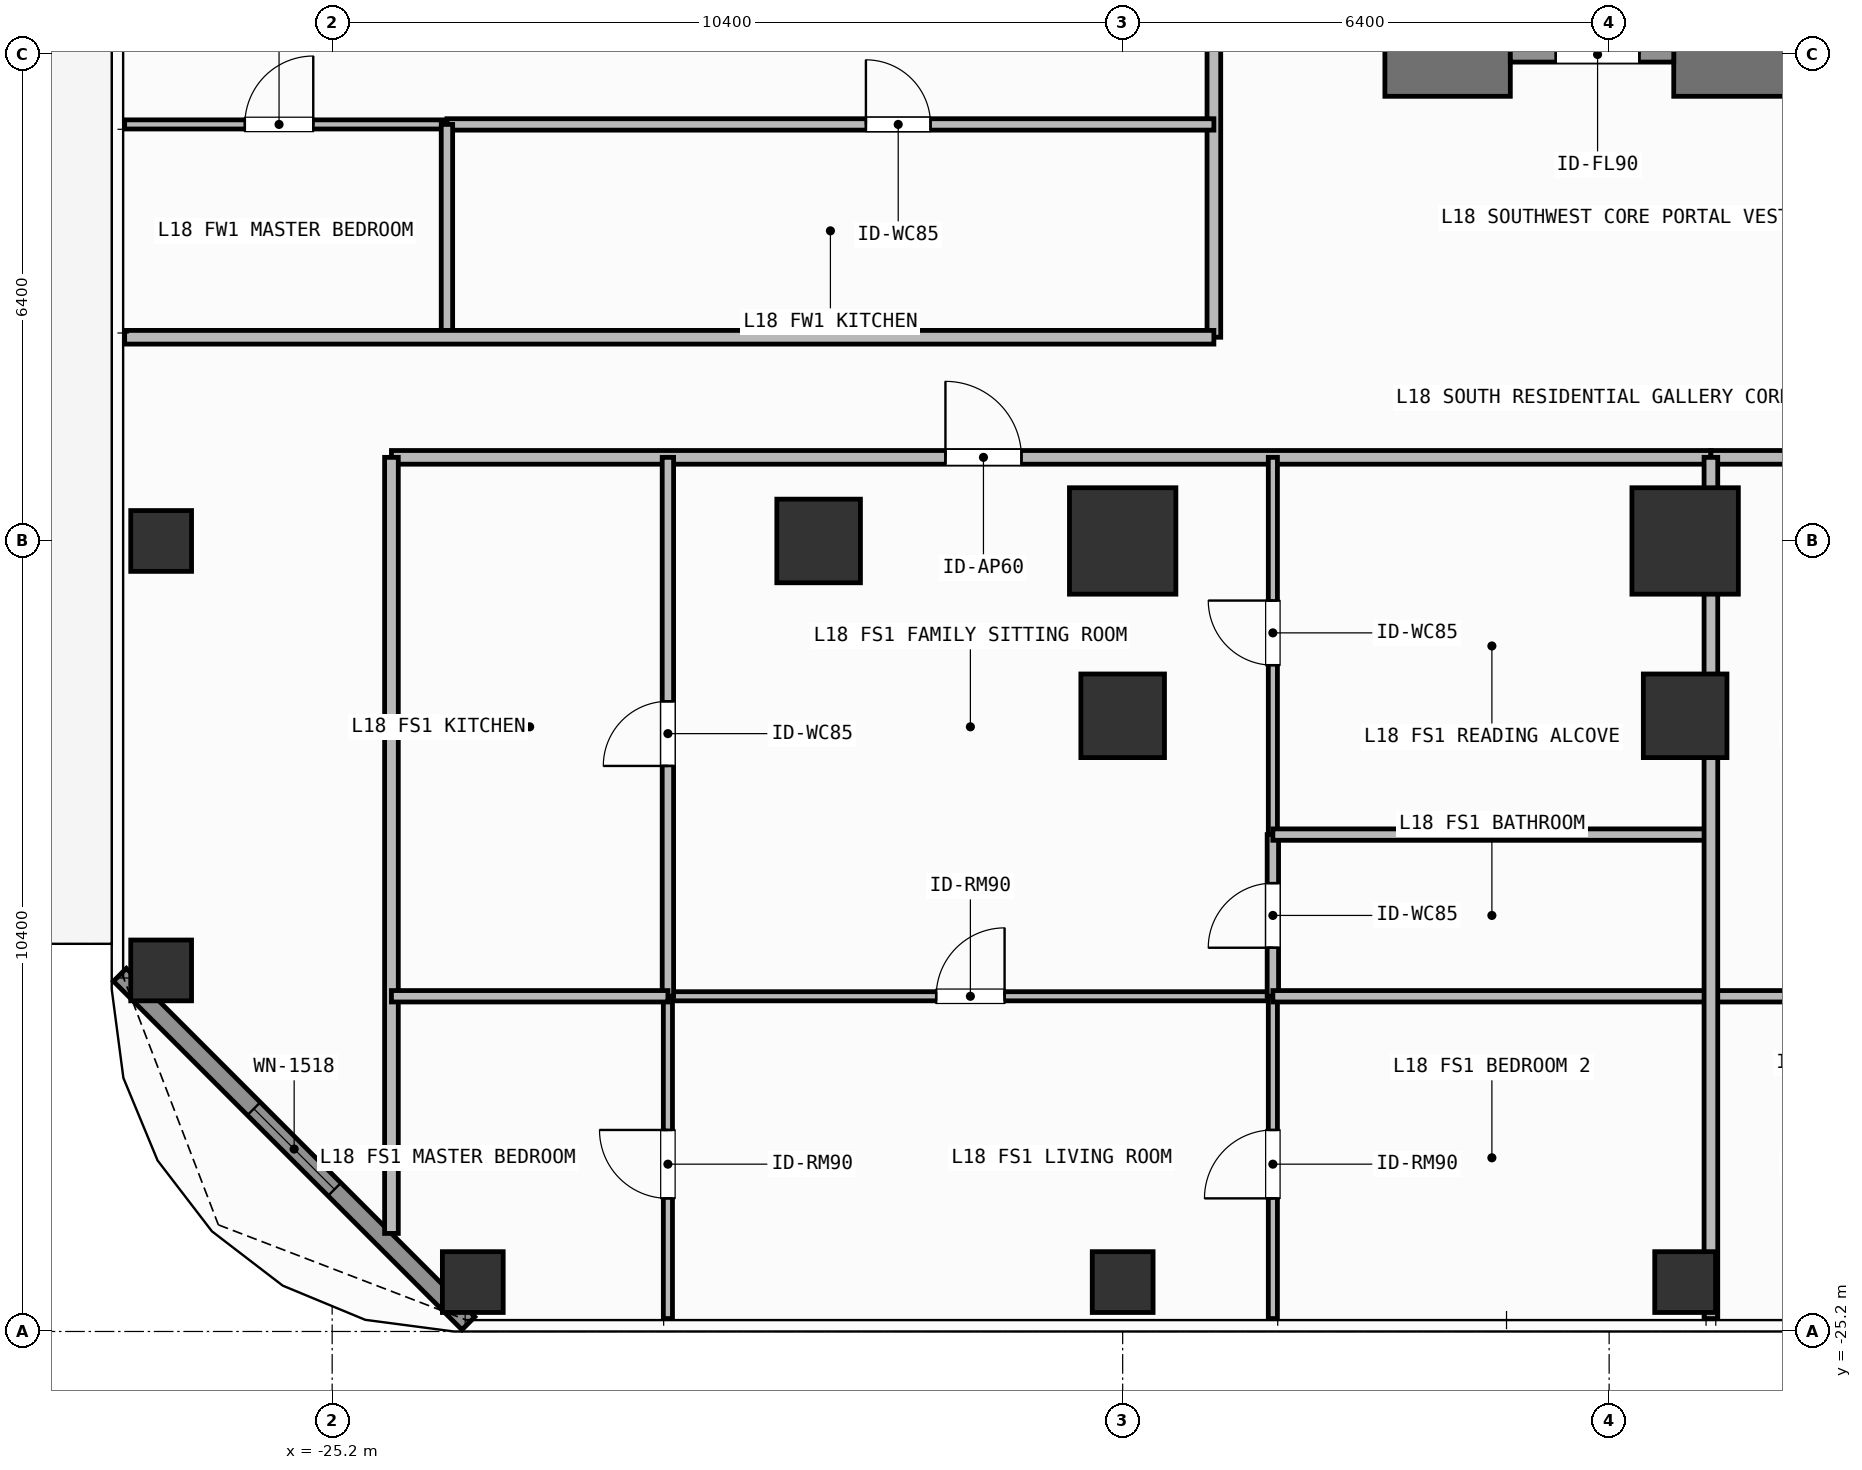
"""IFC4 building model, lengths in metres.
Left out: names, types, materials, properties, quantities, classifications, styles, units other than length and angle.
Written with IfcOpenShell. Run it as: python <this file> out.ifc"""

import sys

from ifc_helpers import new_model, si_unit, direction, frame, frame_2d, origin, origin_2d, place, context, subcontext, project, spatial, rectangle, hollow_rectangle, extrude, element, fill, save


model = new_model("IFC4")
c1 = context("Model", 3, precision=1e-05, world=origin(), true_north=direction((0.0, 1.0)))
c2 = subcontext(c1, "Body", "Model", "MODEL_VIEW")
j1 = project(units=[si_unit("LENGTHUNIT", "METRE"), si_unit("PLANEANGLEUNIT", "RADIAN")], contexts=[c1])
p1 = place(None, origin())
s1 = spatial("IfcSite", under=j1, at=p1, CompositionType="ELEMENT")
p2 = place(p1, origin())
s2 = spatial("IfcBuilding", under=s1, at=p2, CompositionType="ELEMENT")
p3 = place(p2, frame((0.0, 0.0, 69.6)))
s3 = spatial("IfcBuildingStorey", under=s2, at=p3, CompositionType="ELEMENT", Elevation=69.6)
p4 = place(p3, frame((-11.35, -8.4, 0.0), z_axis=(0.0, 0.0, 1.0), x_axis=(1.0, 0.0, 0.0)))
e1 = element("IfcWall", 1, at=p4, inside=s3, PredefinedType="SHEAR", context=c2, shape_type="SweptSolid", body=[
    extrude(rectangle(XDim=1.65, YDim=1.1, at=frame_2d((0.825, 0.0))), origin(), (0.0, 0.0, 1.0), 3.9),
])
p5 = place(p3, frame((-7.55, -8.4, 0.0), z_axis=(0.0, 0.0, 1.0), x_axis=(1.0, 0.0, 0.0)))
e2 = element("IfcWall", 2, at=p5, inside=s3, PredefinedType="SHEAR", context=c2, shape_type="SweptSolid", body=[
    extrude(rectangle(XDim=3.35, YDim=1.1, at=frame_2d((1.675, 0.0))), origin(), (0.0, 0.0, 1.0), 3.9),
])
for number, where, z_axis, x_axis in (
    (3, (-14.8, -14.8, 0.0), (0.0, 0.0, 1.0), (1.0, 0.0, 0.0)),
    (4, (-7.4, -14.8, 0.0), (0.0, 0.0, 1.0), (1.0, 0.0, 0.0)),
):
    element("IfcColumn", number, at=place(p3, frame(where, z_axis=z_axis, x_axis=x_axis)), inside=s3, PredefinedType="COLUMN", context=c2, shape_type="SweptSolid", body=[
        extrude(rectangle(XDim=1.4, YDim=1.4, at=origin_2d()), origin(), (0.0, 0.0, 1.0), 3.9),
    ])
for number, where, z_axis, x_axis in (
    (5, (-18.8, -14.8, 0.0), (0.0, 0.0, 1.0), (1.0, 0.0, 0.0)),
    (6, (-14.8, -17.1, 0.0), (0.0, 0.0, 1.0), (1.0, 0.0, 0.0)),
    (7, (-7.4, -17.1, 0.0), (0.0, 0.0, 1.0), (1.0, 0.0, 0.0)),
):
    element("IfcColumn", number, at=place(p3, frame(where, z_axis=z_axis, x_axis=x_axis)), inside=s3, PredefinedType="COLUMN", context=c2, shape_type="SweptSolid", body=[
        extrude(rectangle(XDim=1.1, YDim=1.1, at=origin_2d()), origin(), (0.0, 0.0, 1.0), 3.9),
    ])
for number, where, z_axis, x_axis in (
    (8, (-23.35, -24.55, 0.0), (0.0, 0.0, 1.0), (1.0, 0.0, 0.0)),
    (9, (-27.45, -20.45, 0.0), (0.0, 0.0, 1.0), (1.0, 0.0, 0.0)),
    (10, (-14.8, -24.55, 0.0), (0.0, 0.0, 1.0), (1.0, 0.0, 0.0)),
    (11, (-7.4, -24.55, 0.0), (0.0, 0.0, 1.0), (1.0, 0.0, 0.0)),
    (12, (-27.45, -14.8, 0.0), (0.0, 0.0, 1.0), (1.0, 0.0, 0.0)),
):
    element("IfcColumn", number, at=place(p3, frame(where, z_axis=z_axis, x_axis=x_axis)), inside=s3, PredefinedType="COLUMN", context=c2, shape_type="SweptSolid", body=[
        extrude(hollow_rectangle(XDim=0.8, YDim=0.8, WallThickness=0.036, at=origin_2d()), origin(), (0.0, 0.0, 1.0), 3.9),
    ])
p6 = place(p3, frame((-23.408, -25.092, 0.0), z_axis=(0.0, 0.0, 1.0), x_axis=(-0.707106781187, 0.707106781187, 0.0)))
e13 = element("IfcWall", 13, at=p6, inside=s3, PredefinedType="SOLIDWALL", context=c2, shape_type="SweptSolid", body=[
    extrude(rectangle(XDim=6.484, YDim=0.24, at=frame_2d((3.242, 0.0))), origin(), (0.0, 0.0, 1.0), 3.68),
])
p7 = place(p6, frame((2.492, 0.0, 0.8)))
e14 = element("IfcOpeningElement", 14, at=p7, cuts=e13, PredefinedType="OPENING", context=c2, shape_type="SweptSolid", body=[
    extrude(rectangle(XDim=1.5, YDim=1.85, at=frame_2d((0.75, 0.925))), frame((0.0, 0.13, 0.0), z_axis=(0.0, -1.0, 0.0), x_axis=(1.0, 0.0, 0.0)), (0.0, 0.0, 1.0), 0.26),
])
p8 = place(p3, frame((-9.7, -8.4, 0.0), z_axis=(0.0, 0.0, 1.0), x_axis=(1.0, 0.0, 0.0)))
e15 = element("IfcWall", 15, at=p8, inside=s3, PredefinedType="SOLIDWALL", context=c2, shape_type="SweptSolid", body=[
    extrude(rectangle(XDim=2.15, YDim=0.2, at=frame_2d((1.075, 0.0))), origin(), (0.0, 0.0, 1.0), 2.72),
])
p9 = place(p8, frame((0.598, 0.0, 0.0)))
e16 = element("IfcOpeningElement", 16, at=p9, cuts=e15, PredefinedType="OPENING", context=c2, shape_type="SweptSolid", body=[
    extrude(rectangle(XDim=1.1, YDim=2.15, at=frame_2d((0.55, 1.075))), frame((0.0, 0.11, 0.0), z_axis=(0.0, -1.0, 0.0), x_axis=(1.0, 0.0, 0.0)), (0.0, 0.0, 1.0), 0.22),
])
p10 = place(p3, frame((-24.42, -13.7, 0.0), z_axis=(0.0, 0.0, 1.0), x_axis=(1.0, 0.0, 0.0)))
e17 = element("IfcWall", 17, at=p10, inside=s3, PredefinedType="PARTITIONING", context=c2, shape_type="SweptSolid", body=[
    extrude(rectangle(XDim=17.359, YDim=0.18, at=frame_2d((8.679, 0.0))), origin(), (0.0, 0.0, 1.0), 3.68),
])
p11 = place(p10, frame((7.288, 0.0, 0.0)))
e18 = element("IfcOpeningElement", 18, at=p11, cuts=e17, PredefinedType="OPENING", context=c2, shape_type="SweptSolid", body=[
    extrude(rectangle(XDim=1.0, YDim=2.2, at=frame_2d((0.5, 1.1))), frame((0.0, 0.1, 0.0), z_axis=(0.0, -1.0, 0.0), x_axis=(1.0, 0.0, 0.0)), (0.0, 0.0, 1.0), 0.2),
])
p12 = place(p3, frame((-20.783, -20.79, 0.0), z_axis=(0.0, 0.0, 1.0), x_axis=(1.0, 0.0, 0.0)))
e19 = element("IfcWall", 19, at=p12, inside=s3, PredefinedType="PARTITIONING", context=c2, shape_type="SweptSolid", body=[
    extrude(rectangle(XDim=7.959, YDim=0.12, at=frame_2d((3.979, 0.0))), origin(), (0.0, 0.0, 1.0), 3.68),
])
p13 = place(p12, frame((3.53, 0.0, 0.0)))
e20 = element("IfcOpeningElement", 20, at=p13, cuts=e19, PredefinedType="OPENING", context=c2, shape_type="SweptSolid", body=[
    extrude(rectangle(XDim=0.9, YDim=2.1, at=frame_2d((0.45, 1.05))), frame((0.0, 0.07, 0.0), z_axis=(0.0, -1.0, 0.0), x_axis=(1.0, 0.0, 0.0)), (0.0, 0.0, 1.0), 0.14),
])
p14 = place(p3, frame((-20.783, -20.79, 0.0), z_axis=(0.0, 0.0, 1.0), x_axis=(0.0, 1.0, 0.0)))
e21 = element("IfcWall", 21, at=p14, inside=s3, PredefinedType="PARTITIONING", context=c2, shape_type="SweptSolid", body=[
    extrude(rectangle(XDim=7.09, YDim=0.15, at=frame_2d((3.545, 0.0))), origin(), (0.0, 0.0, 1.0), 3.68),
])
p15 = place(p14, frame((3.03, 0.0, 0.0)))
e22 = element("IfcOpeningElement", 22, at=p15, cuts=e21, PredefinedType="OPENING", context=c2, shape_type="SweptSolid", body=[
    extrude(rectangle(XDim=0.85, YDim=2.1, at=frame_2d((0.425, 1.05))), frame((0.0, 0.085, 0.0), z_axis=(0.0, -1.0, 0.0), x_axis=(1.0, 0.0, 0.0)), (0.0, 0.0, 1.0), 0.17),
])
p16 = place(p3, frame((-20.783, -25.03, 0.0), z_axis=(0.0, 0.0, 1.0), x_axis=(0.0, 1.0, 0.0)))
e23 = element("IfcWall", 23, at=p16, inside=s3, PredefinedType="PARTITIONING", context=c2, shape_type="SweptSolid", body=[
    extrude(rectangle(XDim=4.24, YDim=0.12, at=frame_2d((2.12, 0.0))), origin(), (0.0, 0.0, 1.0), 3.68),
])
p17 = place(p16, frame((1.581, 0.0, 0.0)))
e24 = element("IfcOpeningElement", 24, at=p17, cuts=e23, PredefinedType="OPENING", context=c2, shape_type="SweptSolid", body=[
    extrude(rectangle(XDim=0.9, YDim=2.1, at=frame_2d((0.45, 1.05))), frame((0.0, 0.07, 0.0), z_axis=(0.0, -1.0, 0.0), x_axis=(1.0, 0.0, 0.0)), (0.0, 0.0, 1.0), 0.14),
])
p18 = place(p3, frame((-12.824, -20.79, 0.0), z_axis=(0.0, 0.0, 1.0), x_axis=(0.0, 1.0, 0.0)))
e25 = element("IfcWall", 25, at=p18, inside=s3, PredefinedType="PARTITIONING", context=c2, shape_type="SweptSolid", body=[
    extrude(rectangle(XDim=2.127, YDim=0.15, at=frame_2d((1.063, 0.0))), origin(), (0.0, 0.0, 1.0), 3.68),
])
p19 = place(p18, frame((0.638, 0.0, 0.0)))
e26 = element("IfcOpeningElement", 26, at=p19, cuts=e25, PredefinedType="OPENING", context=c2, shape_type="SweptSolid", body=[
    extrude(rectangle(XDim=0.85, YDim=2.1, at=frame_2d((0.425, 1.05))), frame((0.0, 0.085, 0.0), z_axis=(0.0, -1.0, 0.0), x_axis=(1.0, 0.0, 0.0)), (0.0, 0.0, 1.0), 0.17),
])
p20 = place(p3, frame((-12.824, -18.663, 0.0), z_axis=(0.0, 0.0, 1.0), x_axis=(0.0, 1.0, 0.0)))
e27 = element("IfcWall", 27, at=p20, inside=s3, PredefinedType="PARTITIONING", context=c2, shape_type="SweptSolid", body=[
    extrude(rectangle(XDim=4.963, YDim=0.12, at=frame_2d((2.481, 0.0))), origin(), (0.0, 0.0, 1.0), 3.68),
])
p21 = place(p20, frame((2.229, 0.0, 0.0)))
e28 = element("IfcOpeningElement", 28, at=p21, cuts=e27, PredefinedType="OPENING", context=c2, shape_type="SweptSolid", body=[
    extrude(rectangle(XDim=0.85, YDim=2.1, at=frame_2d((0.425, 1.05))), frame((0.0, 0.07, 0.0), z_axis=(0.0, -1.0, 0.0), x_axis=(1.0, 0.0, 0.0)), (0.0, 0.0, 1.0), 0.14),
])
p22 = place(p3, frame((-12.824, -25.03, 0.0), z_axis=(0.0, 0.0, 1.0), x_axis=(0.0, 1.0, 0.0)))
e29 = element("IfcWall", 29, at=p22, inside=s3, PredefinedType="PARTITIONING", context=c2, shape_type="SweptSolid", body=[
    extrude(rectangle(XDim=4.24, YDim=0.12, at=frame_2d((2.12, 0.0))), origin(), (0.0, 0.0, 1.0), 3.68),
])
p23 = place(p22, frame((1.581, 0.0, 0.0)))
e30 = element("IfcOpeningElement", 30, at=p23, cuts=e29, PredefinedType="OPENING", context=c2, shape_type="SweptSolid", body=[
    extrude(rectangle(XDim=0.9, YDim=2.1, at=frame_2d((0.45, 1.05))), frame((0.0, 0.07, 0.0), z_axis=(0.0, -1.0, 0.0), x_axis=(1.0, 0.0, 0.0)), (0.0, 0.0, 1.0), 0.14),
])
p24 = place(p3, frame((-7.061, -13.7, 0.0), z_axis=(0.0, 0.0, 1.0), x_axis=(1.0, 0.0, 0.0)))
e31 = element("IfcWall", 31, at=p24, inside=s3, PredefinedType="PARTITIONING", context=c2, shape_type="SweptSolid", body=[
    extrude(rectangle(XDim=9.979, YDim=0.18, at=frame_2d((4.99, 0.0))), origin(), (0.0, 0.0, 1.0), 3.68),
])
p25 = place(p24, frame((4.578, 0.0, 0.0)))
e32 = element("IfcOpeningElement", 32, at=p25, cuts=e31, PredefinedType="OPENING", context=c2, shape_type="SweptSolid", body=[
    extrude(rectangle(XDim=1.0, YDim=2.2, at=frame_2d((0.5, 1.1))), frame((0.0, 0.1, 0.0), z_axis=(0.0, -1.0, 0.0), x_axis=(1.0, 0.0, 0.0)), (0.0, 0.0, 1.0), 0.2),
])
p26 = place(p3, frame((-13.6, -12.12, 0.0), z_axis=(0.0, 0.0, 1.0), x_axis=(0.0, 1.0, 0.0)))
e33 = element("IfcWall", 33, at=p26, inside=s3, PredefinedType="PARTITIONING", context=c2, shape_type="SweptSolid", body=[
    extrude(rectangle(XDim=11.247, YDim=0.18, at=frame_2d((5.624, 0.0))), origin(), (0.0, 0.0, 1.0), 3.68),
])
p27 = place(p26, frame((5.478, 0.0, 0.0)))
e34 = element("IfcOpeningElement", 34, at=p27, cuts=e33, PredefinedType="OPENING", context=c2, shape_type="SweptSolid", body=[
    extrude(rectangle(XDim=1.0, YDim=2.2, at=frame_2d((0.5, 1.1))), frame((0.0, 0.1, 0.0), z_axis=(0.0, -1.0, 0.0), x_axis=(1.0, 0.0, 0.0)), (0.0, 0.0, 1.0), 0.2),
])
p28 = place(p3, frame((-23.69, -9.32, 0.0), z_axis=(0.0, 0.0, 1.0), x_axis=(1.0, 0.0, 0.0)))
e35 = element("IfcWall", 35, at=p28, inside=s3, PredefinedType="PARTITIONING", context=c2, shape_type="SweptSolid", body=[
    extrude(rectangle(XDim=10.09, YDim=0.15, at=frame_2d((5.045, 0.0))), origin(), (0.0, 0.0, 1.0), 3.68),
])
p29 = place(p28, frame((5.512, 0.0, 0.0)))
e36 = element("IfcOpeningElement", 36, at=p29, cuts=e35, PredefinedType="OPENING", context=c2, shape_type="SweptSolid", body=[
    extrude(rectangle(XDim=0.85, YDim=2.1, at=frame_2d((0.425, 1.05))), frame((0.0, 0.085, 0.0), z_axis=(0.0, -1.0, 0.0), x_axis=(1.0, 0.0, 0.0)), (0.0, 0.0, 1.0), 0.17),
])
p30 = place(p3, frame((-27.93, -9.32, 0.0), z_axis=(0.0, 0.0, 1.0), x_axis=(1.0, 0.0, 0.0)))
e37 = element("IfcWall", 37, at=p30, inside=s3, PredefinedType="PARTITIONING", context=c2, shape_type="SweptSolid", body=[
    extrude(rectangle(XDim=4.24, YDim=0.12, at=frame_2d((2.12, 0.0))), origin(), (0.0, 0.0, 1.0), 3.68),
])
p31 = place(p30, frame((1.581, 0.0, 0.0)))
e38 = element("IfcOpeningElement", 38, at=p31, cuts=e37, PredefinedType="OPENING", context=c2, shape_type="SweptSolid", body=[
    extrude(rectangle(XDim=0.9, YDim=2.1, at=frame_2d((0.45, 1.05))), frame((0.0, 0.07, 0.0), z_axis=(0.0, -1.0, 0.0), x_axis=(1.0, 0.0, 0.0)), (0.0, 0.0, 1.0), 0.14),
])
p32 = place(p3, frame((-24.42, -23.91, 0.0), z_axis=(0.0, 0.0, 1.0), x_axis=(0.0, 1.0, 0.0)))
e39 = element("IfcWall", 39, at=p32, inside=s3, PredefinedType="PARTITIONING", context=c2, shape_type="SweptSolid", body=[
    extrude(rectangle(XDim=10.21, YDim=0.18, at=frame_2d((5.105, 0.0))), origin(), (0.0, 0.0, 1.0), 3.68),
])
p33 = place(p3, frame((-24.42, -20.79, 0.0), z_axis=(0.0, 0.0, 1.0), x_axis=(1.0, 0.0, 0.0)))
e40 = element("IfcWall", 40, at=p33, inside=s3, PredefinedType="PARTITIONING", context=c2, shape_type="SweptSolid", body=[
    extrude(rectangle(XDim=3.637, YDim=0.15, at=frame_2d((1.818, 0.0))), origin(), (0.0, 0.0, 1.0), 3.68),
])
for number, where, z_axis, x_axis in (
    (41, (-12.824, -18.663, 0.0), (0.0, 0.0, 1.0), (1.0, 0.0, 0.0)),
    (42, (-12.824, -20.79, 0.0), (0.0, 0.0, 1.0), (1.0, 0.0, 0.0)),
):
    element("IfcWall", number, at=place(p3, frame(where, z_axis=z_axis, x_axis=x_axis)), inside=s3, PredefinedType="PARTITIONING", context=c2, shape_type="SweptSolid", body=[
        extrude(rectangle(XDim=5.763, YDim=0.15, at=frame_2d((2.881, 0.0))), origin(), (0.0, 0.0, 1.0), 3.68),
    ])
p34 = place(p3, frame((-7.061, -20.79, 0.0), z_axis=(0.0, 0.0, 1.0), x_axis=(1.0, 0.0, 0.0)))
e43 = element("IfcWall", 43, at=p34, inside=s3, PredefinedType="PARTITIONING", context=c2, shape_type="SweptSolid", body=[
    extrude(rectangle(XDim=3.373, YDim=0.15, at=frame_2d((1.687, 0.0))), origin(), (0.0, 0.0, 1.0), 3.68),
])
p35 = place(p3, frame((-7.061, -25.03, 0.0), z_axis=(0.0, 0.0, 1.0), x_axis=(0.0, 1.0, 0.0)))
e44 = element("IfcWall", 44, at=p35, inside=s3, PredefinedType="PARTITIONING", context=c2, shape_type="SweptSolid", body=[
    extrude(rectangle(XDim=11.33, YDim=0.18, at=frame_2d((5.665, 0.0))), origin(), (0.0, 0.0, 1.0), 3.68),
])
p36 = place(p3, frame((-23.69, -12.12, 0.0), z_axis=(0.0, 0.0, 1.0), x_axis=(0.0, 1.0, 0.0)))
e45 = element("IfcWall", 45, at=p36, inside=s3, PredefinedType="PARTITIONING", context=c2, shape_type="SweptSolid", body=[
    extrude(rectangle(XDim=2.8, YDim=0.15, at=frame_2d((1.4, 0.0))), origin(), (0.0, 0.0, 1.0), 3.68),
])
p37 = place(p3, frame((-27.93, -12.12, 0.0), z_axis=(0.0, 0.0, 1.0), x_axis=(1.0, 0.0, 0.0)))
e46 = element("IfcWall", 46, at=p37, inside=s3, PredefinedType="PARTITIONING", context=c2, shape_type="SweptSolid", body=[
    extrude(rectangle(XDim=14.33, YDim=0.18, at=frame_2d((7.165, 0.0))), origin(), (0.0, 0.0, 1.0), 3.68),
])
p38 = place(p7, origin())
e47 = element("IfcWindow", 47, at=p38, inside=s3, PartitioningType="SINGLE_PANEL", PredefinedType="WINDOW", context=c2, shape_type="SweptSolid", body=[
    extrude(rectangle(XDim=1.5, YDim=1.85, at=frame_2d((0.75, 0.925))), frame((0.0, 0.03, 0.0), z_axis=(0.0, -1.0, 0.0), x_axis=(1.0, 0.0, 0.0)), (0.0, 0.0, 1.0), 0.06),
])
fill(e14, e47)
p39 = place(p9, origin())
e48 = element("IfcDoor", 48, at=p39, inside=s3, OperationType="SINGLE_SWING_RIGHT", PredefinedType="DOOR", context=c2, shape_type="SweptSolid", body=[
    extrude(rectangle(XDim=1.1, YDim=2.15, at=frame_2d((0.55, 1.075))), frame((0.0, 0.025, 0.0), z_axis=(0.0, -1.0, 0.0), x_axis=(1.0, 0.0, 0.0)), (0.0, 0.0, 1.0), 0.05),
])
fill(e16, e48)
p40 = place(p11, origin())
e49 = element("IfcDoor", 49, at=p40, inside=s3, OperationType="SINGLE_SWING_LEFT", PredefinedType="DOOR", context=c2, shape_type="SweptSolid", body=[
    extrude(rectangle(XDim=1.0, YDim=2.2, at=frame_2d((0.5, 1.1))), frame((0.0, 0.025, 0.0), z_axis=(0.0, -1.0, 0.0), x_axis=(1.0, 0.0, 0.0)), (0.0, 0.0, 1.0), 0.05),
])
fill(e18, e49)
p41 = place(p13, origin())
e50 = element("IfcDoor", 50, at=p41, inside=s3, OperationType="SINGLE_SWING_RIGHT", PredefinedType="DOOR", context=c2, shape_type="SweptSolid", body=[
    extrude(rectangle(XDim=0.9, YDim=2.1, at=frame_2d((0.45, 1.05))), frame((0.0, 0.025, 0.0), z_axis=(0.0, -1.0, 0.0), x_axis=(1.0, 0.0, 0.0)), (0.0, 0.0, 1.0), 0.05),
])
fill(e20, e50)
p42 = place(p15, origin())
e51 = element("IfcDoor", 51, at=p42, inside=s3, OperationType="SINGLE_SWING_LEFT", PredefinedType="DOOR", context=c2, shape_type="SweptSolid", body=[
    extrude(rectangle(XDim=0.85, YDim=2.1, at=frame_2d((0.425, 1.05))), frame((0.0, 0.025, 0.0), z_axis=(0.0, -1.0, 0.0), x_axis=(1.0, 0.0, 0.0)), (0.0, 0.0, 1.0), 0.05),
])
fill(e22, e51)
p43 = place(p17, origin())
e52 = element("IfcDoor", 52, at=p43, inside=s3, OperationType="SINGLE_SWING_RIGHT", PredefinedType="DOOR", context=c2, shape_type="SweptSolid", body=[
    extrude(rectangle(XDim=0.9, YDim=2.1, at=frame_2d((0.45, 1.05))), frame((0.0, 0.025, 0.0), z_axis=(0.0, -1.0, 0.0), x_axis=(1.0, 0.0, 0.0)), (0.0, 0.0, 1.0), 0.05),
])
fill(e24, e52)
p44 = place(p19, origin())
e53 = element("IfcDoor", 53, at=p44, inside=s3, OperationType="SINGLE_SWING_LEFT", PredefinedType="DOOR", context=c2, shape_type="SweptSolid", body=[
    extrude(rectangle(XDim=0.85, YDim=2.1, at=frame_2d((0.425, 1.05))), frame((0.0, 0.025, 0.0), z_axis=(0.0, -1.0, 0.0), x_axis=(1.0, 0.0, 0.0)), (0.0, 0.0, 1.0), 0.05),
])
fill(e26, e53)
p45 = place(p21, origin())
e54 = element("IfcDoor", 54, at=p45, inside=s3, OperationType="SINGLE_SWING_RIGHT", PredefinedType="DOOR", context=c2, shape_type="SweptSolid", body=[
    extrude(rectangle(XDim=0.85, YDim=2.1, at=frame_2d((0.425, 1.05))), frame((0.0, 0.025, 0.0), z_axis=(0.0, -1.0, 0.0), x_axis=(1.0, 0.0, 0.0)), (0.0, 0.0, 1.0), 0.05),
])
fill(e28, e54)
p46 = place(p23, origin())
e55 = element("IfcDoor", 55, at=p46, inside=s3, OperationType="SINGLE_SWING_LEFT", PredefinedType="DOOR", context=c2, shape_type="SweptSolid", body=[
    extrude(rectangle(XDim=0.9, YDim=2.1, at=frame_2d((0.45, 1.05))), frame((0.0, 0.025, 0.0), z_axis=(0.0, -1.0, 0.0), x_axis=(1.0, 0.0, 0.0)), (0.0, 0.0, 1.0), 0.05),
])
fill(e30, e55)
p47 = place(p29, origin())
e56 = element("IfcDoor", 56, at=p47, inside=s3, OperationType="SINGLE_SWING_LEFT", PredefinedType="DOOR", context=c2, shape_type="SweptSolid", body=[
    extrude(rectangle(XDim=0.85, YDim=2.1, at=frame_2d((0.425, 1.05))), frame((0.0, 0.025, 0.0), z_axis=(0.0, -1.0, 0.0), x_axis=(1.0, 0.0, 0.0)), (0.0, 0.0, 1.0), 0.05),
])
fill(e36, e56)
p48 = place(p31, origin())
e57 = element("IfcDoor", 57, at=p48, inside=s3, OperationType="SINGLE_SWING_RIGHT", PredefinedType="DOOR", context=c2, shape_type="SweptSolid", body=[
    extrude(rectangle(XDim=0.9, YDim=2.1, at=frame_2d((0.45, 1.05))), frame((0.0, 0.025, 0.0), z_axis=(0.0, -1.0, 0.0), x_axis=(1.0, 0.0, 0.0)), (0.0, 0.0, 1.0), 0.05),
])
fill(e38, e57)
save(model, sys.argv[1])
